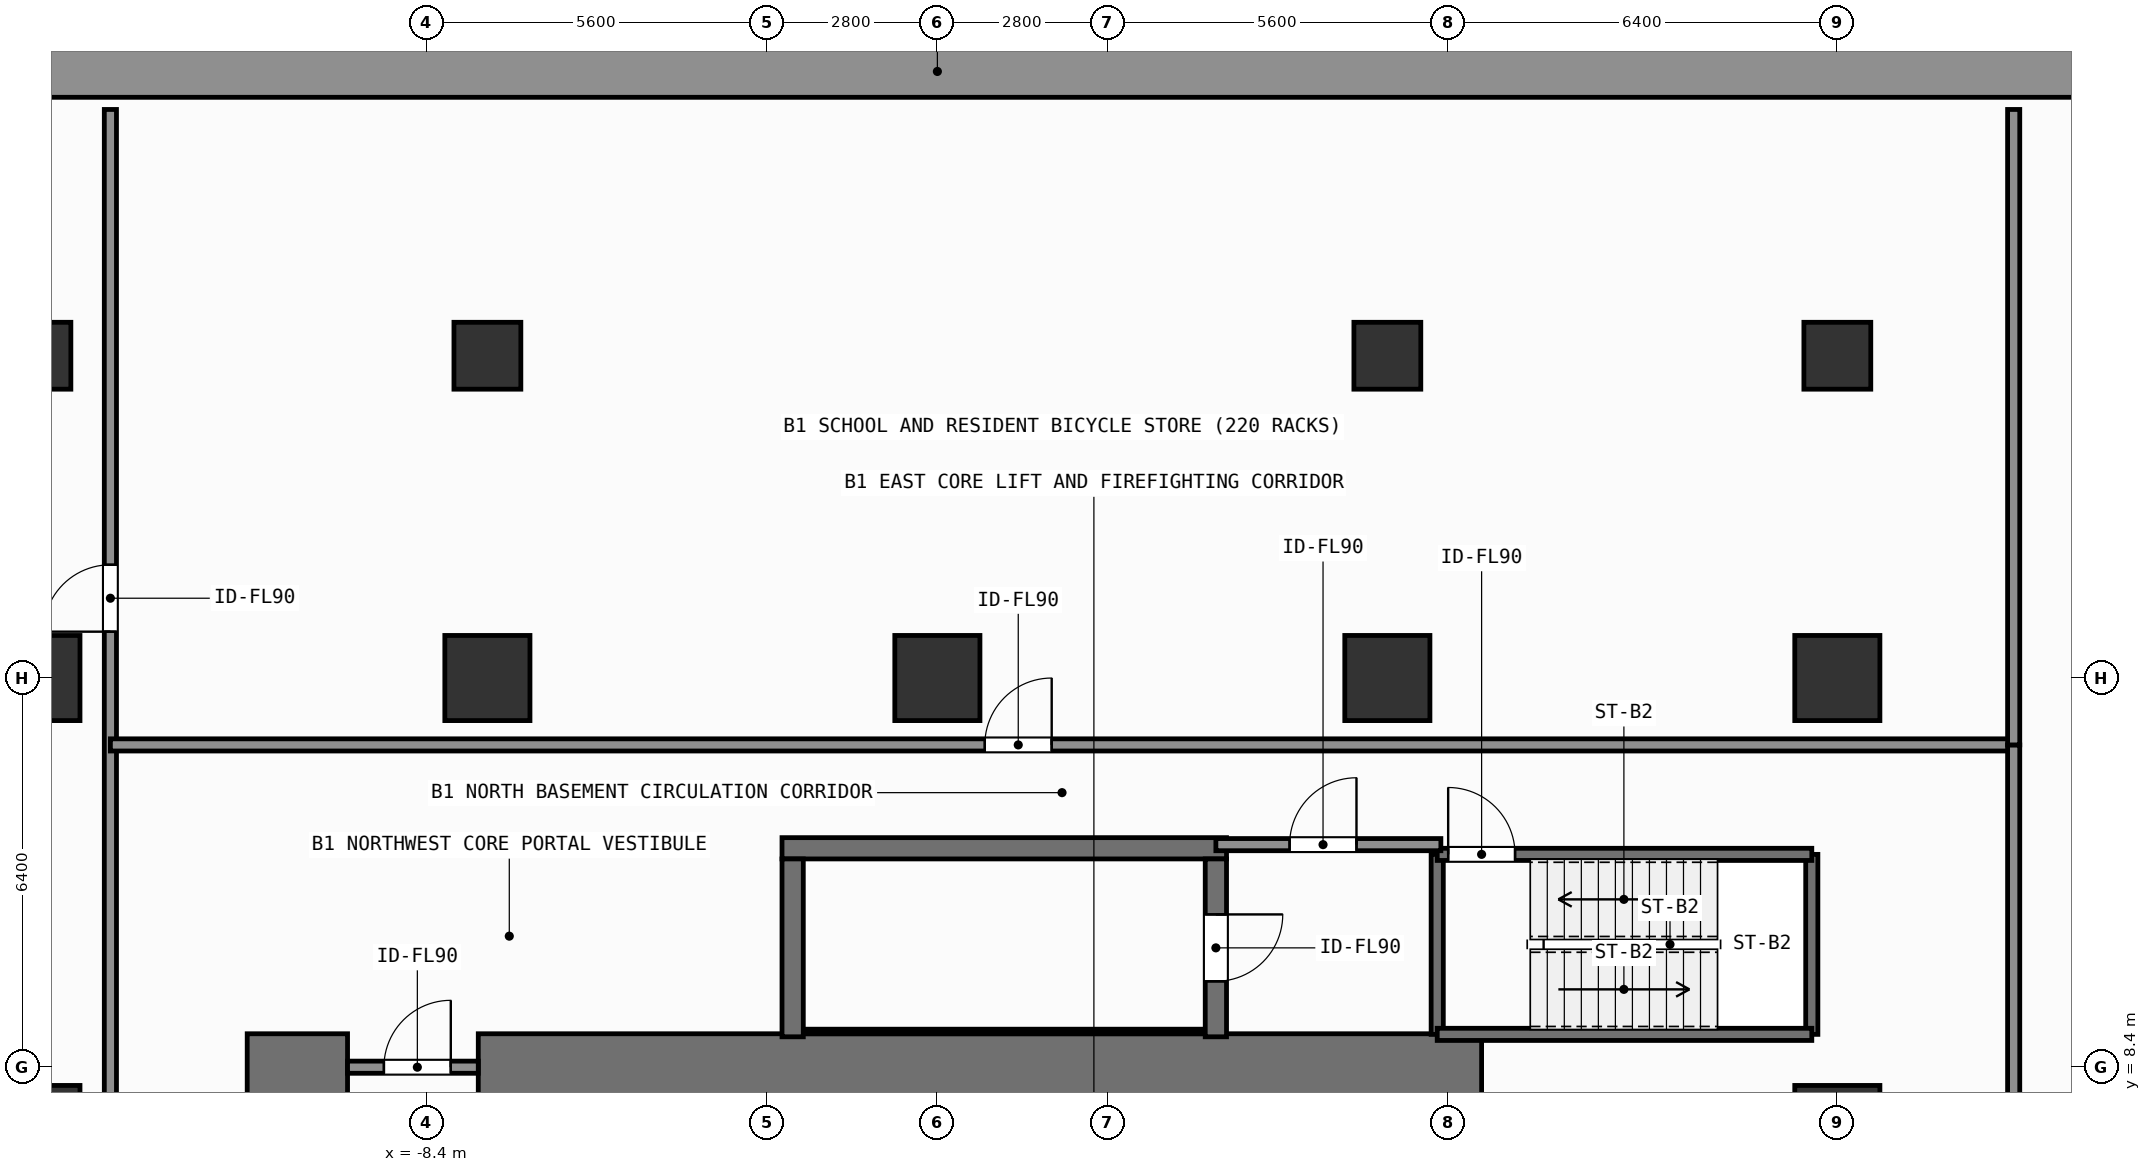
"""IFC4 building model, lengths in metres.
Left out: names, types, materials, properties, quantities, classifications, styles, units other than length and angle.
Written with IfcOpenShell. Run it as: python <this file> out.ifc"""

import sys

from ifc_helpers import new_model, si_unit, direction, frame, frame_2d, origin, origin_2d, place, context, subcontext, project, spatial, rectangle, extrude, element, fill, save


model = new_model("IFC4")
c1 = context("Model", 3, precision=1e-05, world=origin(), true_north=direction((0.0, 1.0)))
c2 = subcontext(c1, "Body", "Model", "MODEL_VIEW")
j1 = project(units=[si_unit("LENGTHUNIT", "METRE"), si_unit("PLANEANGLEUNIT", "RADIAN")], contexts=[c1])
p1 = place(None, origin())
s1 = spatial("IfcSite", under=j1, at=p1, CompositionType="ELEMENT")
p2 = place(p1, origin())
s2 = spatial("IfcBuilding", under=s1, at=p2, CompositionType="ELEMENT")
p3 = place(p2, frame((0.0, 0.0, -4.2)))
s3 = spatial("IfcBuildingStorey", under=s2, at=p3, CompositionType="ELEMENT", Elevation=-4.2)
p4 = place(p3, frame((-33.6, 24.775, 0.0), z_axis=(0.0, 0.0, 1.0), x_axis=(1.0, 0.0, 0.0)))
e1 = element("IfcWall", 1, at=p4, inside=s3, PredefinedType="SOLIDWALL", context=c2, shape_type="SweptSolid", body=[
    extrude(rectangle(XDim=67.2, YDim=0.85, at=frame_2d((33.6, 0.0))), origin(), (0.0, 0.0, 1.0), 4.2),
])
p5 = place(p3, frame((-11.35, 8.4, 0.0), z_axis=(0.0, 0.0, 1.0), x_axis=(1.0, 0.0, 0.0)))
e2 = element("IfcWall", 2, at=p5, inside=s3, PredefinedType="SHEAR", context=c2, shape_type="SweptSolid", body=[
    extrude(rectangle(XDim=1.65, YDim=1.1, at=frame_2d((0.825, 0.0))), origin(), (0.0, 0.0, 1.0), 4.2),
])
p6 = place(p3, frame((-7.55, 8.4, 0.0), z_axis=(0.0, 0.0, 1.0), x_axis=(1.0, 0.0, 0.0)))
e3 = element("IfcWall", 3, at=p6, inside=s3, PredefinedType="SHEAR", context=c2, shape_type="SweptSolid", body=[
    extrude(rectangle(XDim=16.5, YDim=1.1, at=frame_2d((8.25, 0.0))), origin(), (0.0, 0.0, 1.0), 4.2),
])
p7 = place(p3, frame((-2.555, 12.0, 0.0), z_axis=(0.0, 0.0, 1.0), x_axis=(1.0, 0.0, 0.0)))
e4 = element("IfcWall", 4, at=p7, inside=s3, PredefinedType="SHEAR", context=c2, shape_type="SweptSolid", body=[
    extrude(rectangle(XDim=7.31, YDim=0.35, at=frame_2d((3.655, 0.0))), origin(), (0.0, 0.0, 1.0), 4.2),
])
p8 = place(p3, frame((-2.2, 8.988, 0.0), z_axis=(0.0, 0.0, 1.0), x_axis=(1.0, 0.0, 0.0)))
e5 = element("IfcWall", 5, at=p8, inside=s3, PredefinedType="SHEAR", context=c2, shape_type="SweptSolid", body=[
    extrude(rectangle(XDim=6.6, YDim=0.075, at=frame_2d((3.3, 0.0))), origin(), (0.0, 0.0, 1.0), 4.2),
])
p9 = place(p3, frame((-2.38, 8.9, 0.0), z_axis=(0.0, 0.0, 1.0), x_axis=(0.0, 1.0, 0.0)))
e6 = element("IfcWall", 6, at=p9, inside=s3, PredefinedType="SHEAR", context=c2, shape_type="SweptSolid", body=[
    extrude(rectangle(XDim=2.925, YDim=0.35, at=frame_2d((1.462, 0.0))), origin(), (0.0, 0.0, 1.0), 4.2),
])
p10 = place(p3, frame((4.58, 11.825, 0.0), z_axis=(0.0, 0.0, 1.0), x_axis=(0.0, -1.0, 0.0)))
e7 = element("IfcWall", 7, at=p10, inside=s3, PredefinedType="SHEAR", context=c2, shape_type="SweptSolid", body=[
    extrude(rectangle(XDim=2.925, YDim=0.35, at=frame_2d((1.462, 0.0))), origin(), (0.0, 0.0, 1.0), 4.2),
])
p11 = place(p10, frame((0.913, 0.0, 0.0)))
e8 = element("IfcOpeningElement", 8, at=p11, cuts=e7, PredefinedType="OPENING", context=c2, shape_type="SweptSolid", body=[
    extrude(rectangle(XDim=1.1, YDim=2.15, at=frame_2d((0.55, 1.075))), frame((0.0, 0.185, 0.0), z_axis=(0.0, -1.0, 0.0), x_axis=(1.0, 0.0, 0.0)), (0.0, 0.0, 1.0), 0.37),
])
for number, where, z_axis, x_axis in (
    (9, (-14.8, 14.8, 0.0), (0.0, 0.0, 1.0), (1.0, 0.0, 0.0)),
    (10, (-7.4, 14.8, 0.0), (0.0, 0.0, 1.0), (1.0, 0.0, 0.0)),
    (11, (0.0, 14.8, 0.0), (0.0, 0.0, 1.0), (1.0, 0.0, 0.0)),
    (12, (7.4, 14.8, 0.0), (0.0, 0.0, 1.0), (1.0, 0.0, 0.0)),
    (13, (14.8, 14.8, 0.0), (0.0, 0.0, 1.0), (1.0, 0.0, 0.0)),
    (14, (-14.8, 7.4, 0.0), (0.0, 0.0, 1.0), (1.0, 0.0, 0.0)),
    (15, (14.8, 7.4, 0.0), (0.0, 0.0, 1.0), (1.0, 0.0, 0.0)),
):
    element("IfcColumn", number, at=place(p3, frame(where, z_axis=z_axis, x_axis=x_axis)), inside=s3, PredefinedType="COLUMN", context=c2, shape_type="SweptSolid", body=[
        extrude(rectangle(XDim=1.4, YDim=1.4, at=origin_2d()), origin(), (0.0, 0.0, 1.0), 4.2),
    ])
for number, where, z_axis, x_axis in (
    (16, (-14.8, 20.1, 0.0), (0.0, 0.0, 1.0), (1.0, 0.0, 0.0)),
    (17, (-7.4, 20.1, 0.0), (0.0, 0.0, 1.0), (1.0, 0.0, 0.0)),
    (18, (7.4, 20.1, 0.0), (0.0, 0.0, 1.0), (1.0, 0.0, 0.0)),
    (19, (14.8, 20.1, 0.0), (0.0, 0.0, 1.0), (1.0, 0.0, 0.0)),
):
    element("IfcColumn", number, at=place(p3, frame(where, z_axis=z_axis, x_axis=x_axis)), inside=s3, PredefinedType="COLUMN", context=c2, shape_type="SweptSolid", body=[
        extrude(rectangle(XDim=1.1, YDim=1.1, at=origin_2d()), origin(), (0.0, 0.0, 1.0), 4.2),
    ])
for number, where, z_axis, x_axis in (
    (20, (8.22, 8.94, 0.0), (0.0, 0.0, 1.0), (0.0, 1.0, 0.0)),
    (21, (14.38, 11.9, 0.0), (0.0, 0.0, 1.0), (0.0, -1.0, 0.0)),
):
    element("IfcWall", number, at=place(p3, frame(where, z_axis=z_axis, x_axis=x_axis)), inside=s3, PredefinedType="SHEAR", context=c2, shape_type="SweptSolid", body=[
        extrude(rectangle(XDim=2.96, YDim=0.2, at=frame_2d((1.48, 0.0))), origin(), (0.0, 0.0, 1.0), 3.9),
    ])
p12 = place(p3, frame((14.38, 8.94, 0.0), z_axis=(0.0, 0.0, 1.0), x_axis=(-1.0, 0.0, 0.0)))
e22 = element("IfcWall", 22, at=p12, inside=s3, PredefinedType="SHEAR", context=c2, shape_type="SweptSolid", body=[
    extrude(rectangle(XDim=6.16, YDim=0.2, at=frame_2d((3.08, 0.0))), origin(), (0.0, 0.0, 1.0), 3.9),
])
p13 = place(p3, frame((8.22, 11.9, 0.0), z_axis=(0.0, 0.0, 1.0), x_axis=(1.0, 0.0, 0.0)))
e23 = element("IfcWall", 23, at=p13, inside=s3, PredefinedType="SHEAR", context=c2, shape_type="SweptSolid", body=[
    extrude(rectangle(XDim=6.16, YDim=0.2, at=frame_2d((3.08, 0.0))), origin(), (0.0, 0.0, 1.0), 3.9),
])
p14 = place(p13, frame((0.18, 0.0, 0.0)))
e24 = element("IfcOpeningElement", 24, at=p14, cuts=e23, PredefinedType="OPENING", context=c2, shape_type="SweptSolid", body=[
    extrude(rectangle(XDim=1.1, YDim=2.15, at=frame_2d((0.55, 1.075))), frame((0.0, 0.11, 0.0), z_axis=(0.0, -1.0, 0.0), x_axis=(1.0, 0.0, 0.0)), (0.0, 0.0, 1.0), 0.22),
])
p15 = place(p3, frame((4.58, 12.06, 0.0), z_axis=(0.0, 0.0, 1.0), x_axis=(1.0, 0.0, 0.0)))
e25 = element("IfcWall", 25, at=p15, inside=s3, PredefinedType="SOLIDWALL", context=c2, shape_type="SweptSolid", body=[
    extrude(rectangle(XDim=3.7, YDim=0.2, at=frame_2d((1.85, 0.0))), origin(), (0.0, 0.0, 1.0), 3.9),
])
p16 = place(p15, frame((1.212, 0.0, 0.0)))
e26 = element("IfcOpeningElement", 26, at=p16, cuts=e25, PredefinedType="OPENING", context=c2, shape_type="SweptSolid", body=[
    extrude(rectangle(XDim=1.1, YDim=2.15, at=frame_2d((0.55, 1.075))), frame((0.0, 0.11, 0.0), z_axis=(0.0, -1.0, 0.0), x_axis=(1.0, 0.0, 0.0)), (0.0, 0.0, 1.0), 0.22),
])
p17 = place(p3, frame((-9.7, 8.4, 0.0), z_axis=(0.0, 0.0, 1.0), x_axis=(1.0, 0.0, 0.0)))
e27 = element("IfcWall", 27, at=p17, inside=s3, PredefinedType="SOLIDWALL", context=c2, shape_type="SweptSolid", body=[
    extrude(rectangle(XDim=2.15, YDim=0.2, at=frame_2d((1.075, 0.0))), origin(), (0.0, 0.0, 1.0), 2.94),
])
p18 = place(p17, frame((0.598, 0.0, 0.0)))
e28 = element("IfcOpeningElement", 28, at=p18, cuts=e27, PredefinedType="OPENING", context=c2, shape_type="SweptSolid", body=[
    extrude(rectangle(XDim=1.1, YDim=2.15, at=frame_2d((0.55, 1.075))), frame((0.0, 0.11, 0.0), z_axis=(0.0, -1.0, 0.0), x_axis=(1.0, 0.0, 0.0)), (0.0, 0.0, 1.0), 0.22),
])
p19 = place(p3, frame((-13.6, 4.5, 0.0), z_axis=(0.0, 0.0, 1.0), x_axis=(0.0, 1.0, 0.0)))
e29 = element("IfcWall", 29, at=p19, inside=s3, PredefinedType="SOLIDWALL", context=c2, shape_type="SweptSolid", body=[
    extrude(rectangle(XDim=19.65, YDim=0.2, at=frame_2d((9.825, 0.0))), origin(), (0.0, 0.0, 1.0), 3.9),
])
p20 = place(p19, frame((11.062, 0.0, 0.0)))
e30 = element("IfcOpeningElement", 30, at=p20, cuts=e29, PredefinedType="OPENING", context=c2, shape_type="SweptSolid", body=[
    extrude(rectangle(XDim=1.1, YDim=2.15, at=frame_2d((0.55, 1.075))), frame((0.0, 0.11, 0.0), z_axis=(0.0, -1.0, 0.0), x_axis=(1.0, 0.0, 0.0)), (0.0, 0.0, 1.0), 0.22),
])
p21 = place(p3, frame((-13.6, 13.7, 0.0), z_axis=(0.0, 0.0, 1.0), x_axis=(1.0, 0.0, 0.0)))
e31 = element("IfcWall", 31, at=p21, inside=s3, PredefinedType="SOLIDWALL", context=c2, shape_type="SweptSolid", body=[
    extrude(rectangle(XDim=31.3, YDim=0.2, at=frame_2d((15.65, 0.0))), origin(), (0.0, 0.0, 1.0), 3.9),
])
p22 = place(p21, frame((14.38, 0.0, 0.0)))
e32 = element("IfcOpeningElement", 32, at=p22, cuts=e31, PredefinedType="OPENING", context=c2, shape_type="SweptSolid", body=[
    extrude(rectangle(XDim=1.1, YDim=2.15, at=frame_2d((0.55, 1.075))), frame((0.0, 0.11, 0.0), z_axis=(0.0, -1.0, 0.0), x_axis=(1.0, 0.0, 0.0)), (0.0, 0.0, 1.0), 0.22),
])
p23 = place(p3, frame((17.7, -14.55, 0.0), z_axis=(0.0, 0.0, 1.0), x_axis=(0.0, 1.0, 0.0)))
e33 = element("IfcWall", 33, at=p23, inside=s3, PredefinedType="SOLIDWALL", context=c2, shape_type="SweptSolid", body=[
    extrude(rectangle(XDim=28.25, YDim=0.2, at=frame_2d((14.125, 0.0))), origin(), (0.0, 0.0, 1.0), 3.9),
])
p24 = place(p23, frame((15.006, 0.0, 0.0)))
e34 = element("IfcOpeningElement", 34, at=p24, cuts=e33, PredefinedType="OPENING", context=c2, shape_type="SweptSolid", body=[
    extrude(rectangle(XDim=1.1, YDim=2.15, at=frame_2d((0.55, 1.075))), frame((0.0, 0.11, 0.0), z_axis=(0.0, -1.0, 0.0), x_axis=(1.0, 0.0, 0.0)), (0.0, 0.0, 1.0), 0.22),
])
p25 = place(p3, frame((17.7, 13.7, 0.0), z_axis=(0.0, 0.0, 1.0), x_axis=(0.0, 1.0, 0.0)))
e35 = element("IfcWall", 35, at=p25, inside=s3, PredefinedType="SOLIDWALL", context=c2, shape_type="SweptSolid", body=[
    extrude(rectangle(XDim=10.45, YDim=0.2, at=frame_2d((5.225, 0.0))), origin(), (0.0, 0.0, 1.0), 3.9),
])
p26 = place(p11, origin())
e36 = element("IfcDoor", 36, at=p26, inside=s3, OperationType="SINGLE_SWING_LEFT", PredefinedType="DOOR", context=c2, shape_type="SweptSolid", body=[
    extrude(rectangle(XDim=1.1, YDim=2.15, at=frame_2d((0.55, 1.075))), frame((0.0, 0.025, 0.0), z_axis=(0.0, -1.0, 0.0), x_axis=(1.0, 0.0, 0.0)), (0.0, 0.0, 1.0), 0.05),
])
fill(e8, e36)
p27 = place(p14, origin())
e37 = element("IfcDoor", 37, at=p27, inside=s3, OperationType="SINGLE_SWING_LEFT", PredefinedType="DOOR", context=c2, shape_type="SweptSolid", body=[
    extrude(rectangle(XDim=1.1, YDim=2.15, at=frame_2d((0.55, 1.075))), frame((0.0, 0.025, 0.0), z_axis=(0.0, -1.0, 0.0), x_axis=(1.0, 0.0, 0.0)), (0.0, 0.0, 1.0), 0.05),
])
fill(e24, e37)
p28 = place(p16, origin())
e38 = element("IfcDoor", 38, at=p28, inside=s3, OperationType="SINGLE_SWING_RIGHT", PredefinedType="DOOR", context=c2, shape_type="SweptSolid", body=[
    extrude(rectangle(XDim=1.1, YDim=2.15, at=frame_2d((0.55, 1.075))), frame((0.0, 0.025, 0.0), z_axis=(0.0, -1.0, 0.0), x_axis=(1.0, 0.0, 0.0)), (0.0, 0.0, 1.0), 0.05),
])
fill(e26, e38)
p29 = place(p18, origin())
e39 = element("IfcDoor", 39, at=p29, inside=s3, OperationType="SINGLE_SWING_RIGHT", PredefinedType="DOOR", context=c2, shape_type="SweptSolid", body=[
    extrude(rectangle(XDim=1.1, YDim=2.15, at=frame_2d((0.55, 1.075))), frame((0.0, 0.025, 0.0), z_axis=(0.0, -1.0, 0.0), x_axis=(1.0, 0.0, 0.0)), (0.0, 0.0, 1.0), 0.05),
])
fill(e28, e39)
p30 = place(p20, origin())
e40 = element("IfcDoor", 40, at=p30, inside=s3, OperationType="SINGLE_SWING_LEFT", PredefinedType="DOOR", context=c2, shape_type="SweptSolid", body=[
    extrude(rectangle(XDim=1.1, YDim=2.15, at=frame_2d((0.55, 1.075))), frame((0.0, 0.025, 0.0), z_axis=(0.0, -1.0, 0.0), x_axis=(1.0, 0.0, 0.0)), (0.0, 0.0, 1.0), 0.05),
])
fill(e30, e40)
p31 = place(p22, origin())
e41 = element("IfcDoor", 41, at=p31, inside=s3, OperationType="SINGLE_SWING_RIGHT", PredefinedType="DOOR", context=c2, shape_type="SweptSolid", body=[
    extrude(rectangle(XDim=1.1, YDim=2.15, at=frame_2d((0.55, 1.075))), frame((0.0, 0.025, 0.0), z_axis=(0.0, -1.0, 0.0), x_axis=(1.0, 0.0, 0.0)), (0.0, 0.0, 1.0), 0.05),
])
fill(e32, e41)
save(model, sys.argv[1])
